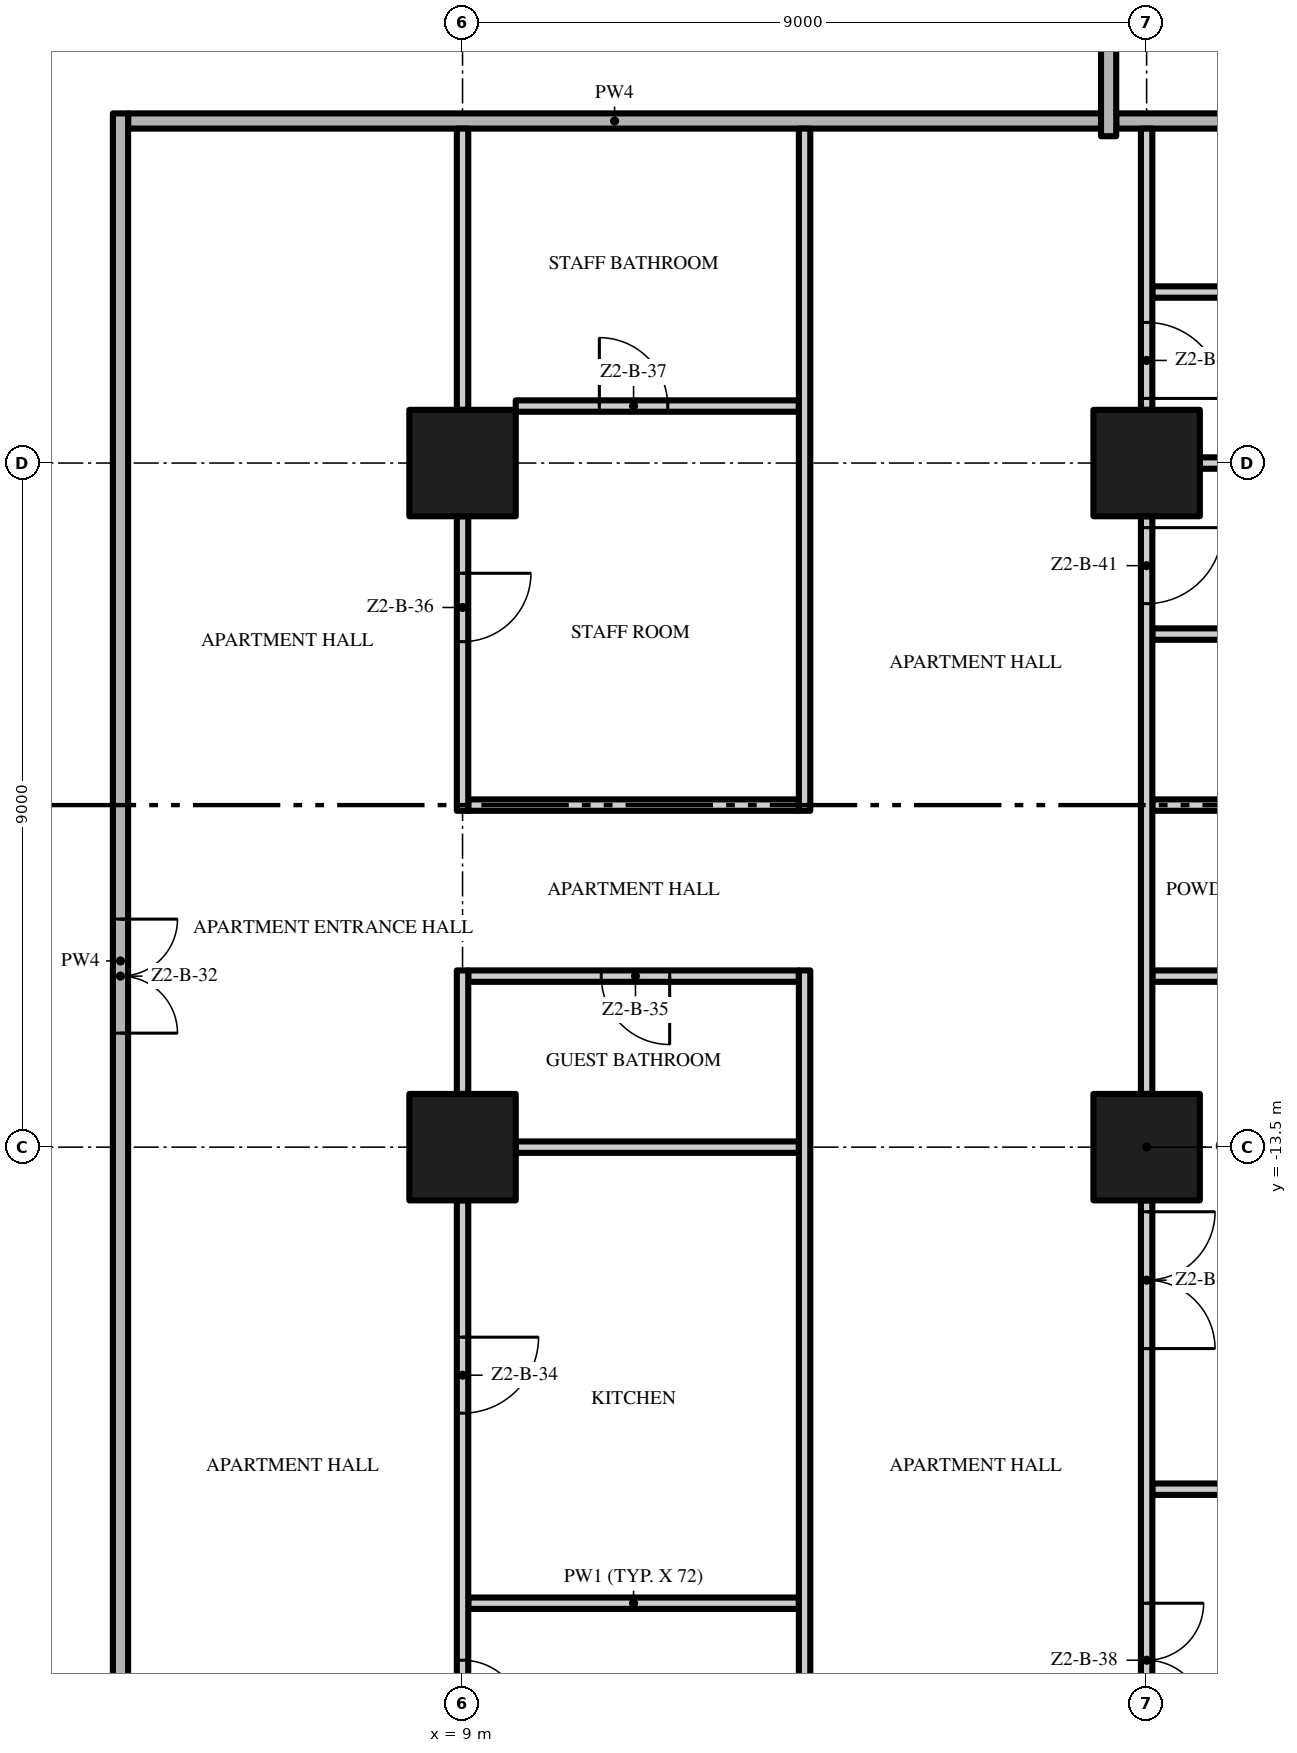
"""IFC4 building model, lengths in metres.
Left out: names, types, materials, properties, quantities, classifications, styles, units other than length and angle.
Written with IfcOpenShell. Run it as: python <this file> out.ifc"""

import sys

from ifc_helpers import new_model, si_unit, direction, frame, frame_2d, origin, origin_2d, place, context, subcontext, project, spatial, rectangle, extrude, element, fill, save


model = new_model("IFC4")
c1 = context("Model", 3, precision=1e-05, world=origin(), true_north=direction((0.0, 1.0)))
c2 = subcontext(c1, "Body", "Model", "MODEL_VIEW")
j1 = project(units=[si_unit("LENGTHUNIT", "METRE"), si_unit("PLANEANGLEUNIT", "RADIAN")], contexts=[c1])
p1 = place(None, origin())
s1 = spatial("IfcSite", under=j1, at=p1, CompositionType="ELEMENT")
p2 = place(p1, origin())
s2 = spatial("IfcBuilding", under=s1, at=p2, CompositionType="ELEMENT")
p3 = place(p2, frame((0.0, 0.0, 84.6)))
s3 = spatial("IfcBuildingStorey", under=s2, at=p3, CompositionType="ELEMENT", Elevation=84.6)
for number, where, z_axis, x_axis in (
    (1, (18.0, -13.5, 0.0), (0.0, 0.0, 1.0), (1.0, 0.0, 0.0)),
    (2, (18.0, -4.5, 0.0), (0.0, 0.0, 1.0), (1.0, 0.0, 0.0)),
    (3, (9.0, -13.5, 0.0), (0.0, 0.0, 1.0), (1.0, 0.0, 0.0)),
    (4, (9.0, -4.5, 0.0), (0.0, 0.0, 1.0), (1.0, 0.0, 0.0)),
):
    element("IfcColumn", number, at=place(p3, frame(where, z_axis=z_axis, x_axis=x_axis)), inside=s3, PredefinedType="COLUMN", context=c2, shape_type="SweptSolid", body=[
        extrude(rectangle(XDim=1.4, YDim=1.4, at=origin_2d()), origin(), (0.0, 0.0, 1.0), 3.5),
    ])
p4 = place(p3, frame((9.075, -19.5, 0.0), z_axis=(0.0, 0.0, 1.0), x_axis=(1.0, 0.0, 0.0)))
e5 = element("IfcWall", 5, at=p4, inside=s3, PredefinedType="PARTITIONING", context=c2, shape_type="SweptSolid", body=[
    extrude(rectangle(XDim=4.35, YDim=0.15, at=frame_2d((2.175, 0.0))), origin(), (0.0, 0.0, 1.0), 3.5),
])
p5 = place(p3, frame((18.075, -18.0, 0.0), z_axis=(0.0, 0.0, 1.0), x_axis=(1.0, 0.0, 0.0)))
e6 = element("IfcWall", 6, at=p5, inside=s3, PredefinedType="PARTITIONING", context=c2, shape_type="SweptSolid", body=[
    extrude(rectangle(XDim=3.775, YDim=0.15, at=frame_2d((1.887, 0.0))), origin(), (0.0, 0.0, 1.0), 3.5),
])
p6 = place(p3, frame((9.7, -13.5, 0.0), z_axis=(0.0, 0.0, 1.0), x_axis=(1.0, 0.0, 0.0)))
e7 = element("IfcWall", 7, at=p6, inside=s3, PredefinedType="PARTITIONING", context=c2, shape_type="SweptSolid", body=[
    extrude(rectangle(XDim=3.725, YDim=0.15, at=frame_2d((1.863, 0.0))), origin(), (0.0, 0.0, 1.0), 3.5),
])
p7 = place(p3, frame((13.425, -11.25, 0.0), z_axis=(0.0, 0.0, 1.0), x_axis=(-1.0, 0.0, 0.0)))
e8 = element("IfcWall", 8, at=p7, inside=s3, PredefinedType="PARTITIONING", context=c2, shape_type="SweptSolid", body=[
    extrude(rectangle(XDim=4.35, YDim=0.15, at=frame_2d((2.175, 0.0))), origin(), (0.0, 0.0, 1.0), 3.5),
])
p8 = place(p7, frame((1.7, 0.0, 0.0)))
e9 = element("IfcOpeningElement", 9, at=p8, cuts=e8, PredefinedType="OPENING", context=c2, shape_type="SweptSolid", body=[
    extrude(rectangle(XDim=0.9, YDim=2.1, at=frame_2d((0.45, 1.05))), frame((0.0, 0.085, 0.0), z_axis=(0.0, -1.0, 0.0), x_axis=(1.0, 0.0, 0.0)), (0.0, 0.0, 1.0), 0.17),
])
p9 = place(p3, frame((18.075, -11.25, 0.0), z_axis=(0.0, 0.0, 1.0), x_axis=(1.0, 0.0, 0.0)))
e10 = element("IfcWall", 10, at=p9, inside=s3, PredefinedType="PARTITIONING", context=c2, shape_type="SweptSolid", body=[
    extrude(rectangle(XDim=2.85, YDim=0.15, at=frame_2d((1.425, 0.0))), origin(), (0.0, 0.0, 1.0), 3.5),
])
p10 = place(p3, frame((9.075, -9.0, 0.0), z_axis=(0.0, 0.0, 1.0), x_axis=(1.0, 0.0, 0.0)))
e11 = element("IfcWall", 11, at=p10, inside=s3, PredefinedType="PARTITIONING", context=c2, shape_type="SweptSolid", body=[
    extrude(rectangle(XDim=4.35, YDim=0.15, at=frame_2d((2.175, 0.0))), origin(), (0.0, 0.0, 1.0), 3.5),
])
for number, where, z_axis, x_axis in (
    (12, (18.075, -9.0, 0.0), (0.0, 0.0, 1.0), (1.0, 0.0, 0.0)),
    (13, (18.075, -6.75, 0.0), (0.0, 0.0, 1.0), (1.0, 0.0, 0.0)),
):
    element("IfcWall", number, at=place(p3, frame(where, z_axis=z_axis, x_axis=x_axis)), inside=s3, PredefinedType="PARTITIONING", context=c2, shape_type="SweptSolid", body=[
        extrude(rectangle(XDim=2.85, YDim=0.15, at=frame_2d((1.425, 0.0))), origin(), (0.0, 0.0, 1.0), 3.5),
    ])
p11 = place(p3, frame((18.7, -4.5, 0.0), z_axis=(0.0, 0.0, 1.0), x_axis=(1.0, 0.0, 0.0)))
e14 = element("IfcWall", 14, at=p11, inside=s3, PredefinedType="PARTITIONING", context=c2, shape_type="SweptSolid", body=[
    extrude(rectangle(XDim=7.0, YDim=0.15, at=frame_2d((3.5, 0.0))), origin(), (0.0, 0.0, 1.0), 3.5),
])
p12 = place(p3, frame((9.7, -3.75, 0.0), z_axis=(0.0, 0.0, 1.0), x_axis=(1.0, 0.0, 0.0)))
e15 = element("IfcWall", 15, at=p12, inside=s3, PredefinedType="PARTITIONING", context=c2, shape_type="SweptSolid", body=[
    extrude(rectangle(XDim=3.725, YDim=0.15, at=frame_2d((1.863, 0.0))), origin(), (0.0, 0.0, 1.0), 3.5),
])
p13 = place(p12, frame((1.1, 0.0, 0.0)))
e16 = element("IfcOpeningElement", 16, at=p13, cuts=e15, PredefinedType="OPENING", context=c2, shape_type="SweptSolid", body=[
    extrude(rectangle(XDim=0.9, YDim=2.1, at=frame_2d((0.45, 1.05))), frame((0.0, 0.085, 0.0), z_axis=(0.0, -1.0, 0.0), x_axis=(1.0, 0.0, 0.0)), (0.0, 0.0, 1.0), 0.17),
])
p14 = place(p3, frame((18.075, -2.25, 0.0), z_axis=(0.0, 0.0, 1.0), x_axis=(1.0, 0.0, 0.0)))
e17 = element("IfcWall", 17, at=p14, inside=s3, PredefinedType="PARTITIONING", context=c2, shape_type="SweptSolid", body=[
    extrude(rectangle(XDim=2.85, YDim=0.15, at=frame_2d((1.425, 0.0))), origin(), (0.0, 0.0, 1.0), 3.5),
])
p15 = place(p3, frame((4.6, 0.0, 0.0), z_axis=(0.0, 0.0, 1.0), x_axis=(1.0, 0.0, 0.0)))
e18 = element("IfcWall", 18, at=p15, inside=s3, PredefinedType="PARTITIONING", context=c2, shape_type="SweptSolid", body=[
    extrude(rectangle(XDim=12.8, YDim=0.2, at=frame_2d((6.4, 0.0))), origin(), (0.0, 0.0, 1.0), 3.5),
])
p16 = place(p3, frame((17.6, 0.0, 0.0), z_axis=(0.0, 0.0, 1.0), x_axis=(1.0, 0.0, 0.0)))
e19 = element("IfcWall", 19, at=p16, inside=s3, PredefinedType="PARTITIONING", context=c2, shape_type="SweptSolid", body=[
    extrude(rectangle(XDim=9.1, YDim=0.2, at=frame_2d((4.55, 0.0))), origin(), (0.0, 0.0, 1.0), 3.5),
])
p17 = place(p3, frame((4.5, 0.1, 0.0), z_axis=(0.0, 0.0, 1.0), x_axis=(0.0, -1.0, 0.0)))
e20 = element("IfcWall", 20, at=p17, inside=s3, PredefinedType="PARTITIONING", context=c2, shape_type="SweptSolid", body=[
    extrude(rectangle(XDim=22.3, YDim=0.2, at=frame_2d((11.15, 0.0))), origin(), (0.0, 0.0, 1.0), 3.5),
])
p18 = place(p17, frame((10.6, 0.0, 0.0)))
e21 = element("IfcOpeningElement", 21, at=p18, cuts=e20, PredefinedType="OPENING", context=c2, shape_type="SweptSolid", body=[
    extrude(rectangle(XDim=1.5, YDim=2.4, at=frame_2d((0.75, 1.2))), frame((0.0, 0.11, 0.0), z_axis=(0.0, -1.0, 0.0), x_axis=(1.0, 0.0, 0.0)), (0.0, 0.0, 1.0), 0.22),
])
p19 = place(p3, frame((9.0, -14.2, 0.0), z_axis=(0.0, 0.0, 1.0), x_axis=(0.0, -1.0, 0.0)))
e22 = element("IfcWall", 22, at=p19, inside=s3, PredefinedType="PARTITIONING", context=c2, shape_type="SweptSolid", body=[
    extrude(rectangle(XDim=7.0, YDim=0.15, at=frame_2d((3.5, 0.0))), origin(), (0.0, 0.0, 1.0), 3.5),
])
p20 = place(p19, frame((6.05, 0.0, 0.0)))
e23 = element("IfcOpeningElement", 23, at=p20, cuts=e22, PredefinedType="OPENING", context=c2, shape_type="SweptSolid", body=[
    extrude(rectangle(XDim=0.8, YDim=2.0, at=frame_2d((0.4, 1.0))), frame((0.0, 0.085, 0.0), z_axis=(0.0, -1.0, 0.0), x_axis=(1.0, 0.0, 0.0)), (0.0, 0.0, 1.0), 0.17),
])
p21 = place(p19, frame((1.8, 0.0, 0.0)))
e24 = element("IfcOpeningElement", 24, at=p21, cuts=e22, PredefinedType="OPENING", context=c2, shape_type="SweptSolid", body=[
    extrude(rectangle(XDim=1.0, YDim=2.4, at=frame_2d((0.5, 1.2))), frame((0.0, 0.085, 0.0), z_axis=(0.0, -1.0, 0.0), x_axis=(1.0, 0.0, 0.0)), (0.0, 0.0, 1.0), 0.17),
])
p22 = place(p3, frame((9.0, -12.8, 0.0), z_axis=(0.0, 0.0, 1.0), x_axis=(0.0, 1.0, 0.0)))
e25 = element("IfcWall", 25, at=p22, inside=s3, PredefinedType="PARTITIONING", context=c2, shape_type="SweptSolid", body=[
    extrude(rectangle(XDim=1.625, YDim=0.15, at=frame_2d((0.812, 0.0))), origin(), (0.0, 0.0, 1.0), 3.5),
])
p23 = place(p3, frame((9.0, -5.2, 0.0), z_axis=(0.0, 0.0, 1.0), x_axis=(0.0, -1.0, 0.0)))
e26 = element("IfcWall", 26, at=p23, inside=s3, PredefinedType="PARTITIONING", context=c2, shape_type="SweptSolid", body=[
    extrude(rectangle(XDim=3.875, YDim=0.15, at=frame_2d((1.938, 0.0))), origin(), (0.0, 0.0, 1.0), 3.5),
])
p24 = place(p23, frame((0.75, 0.0, 0.0)))
e27 = element("IfcOpeningElement", 27, at=p24, cuts=e26, PredefinedType="OPENING", context=c2, shape_type="SweptSolid", body=[
    extrude(rectangle(XDim=0.9, YDim=2.1, at=frame_2d((0.45, 1.05))), frame((0.0, 0.085, 0.0), z_axis=(0.0, -1.0, 0.0), x_axis=(1.0, 0.0, 0.0)), (0.0, 0.0, 1.0), 0.17),
])
p25 = place(p3, frame((9.0, -3.8, 0.0), z_axis=(0.0, 0.0, 1.0), x_axis=(0.0, 1.0, 0.0)))
e28 = element("IfcWall", 28, at=p25, inside=s3, PredefinedType="PARTITIONING", context=c2, shape_type="SweptSolid", body=[
    extrude(rectangle(XDim=3.7, YDim=0.15, at=frame_2d((1.85, 0.0))), origin(), (0.0, 0.0, 1.0), 3.5),
])
p26 = place(p3, frame((13.5, -22.2, 0.0), z_axis=(0.0, 0.0, 1.0), x_axis=(0.0, 1.0, 0.0)))
e29 = element("IfcWall", 29, at=p26, inside=s3, PredefinedType="PARTITIONING", context=c2, shape_type="SweptSolid", body=[
    extrude(rectangle(XDim=11.025, YDim=0.15, at=frame_2d((5.513, 0.0))), origin(), (0.0, 0.0, 1.0), 3.5),
])
p27 = place(p3, frame((13.5, -9.075, 0.0), z_axis=(0.0, 0.0, 1.0), x_axis=(0.0, 1.0, 0.0)))
e30 = element("IfcWall", 30, at=p27, inside=s3, PredefinedType="PARTITIONING", context=c2, shape_type="SweptSolid", body=[
    extrude(rectangle(XDim=8.975, YDim=0.15, at=frame_2d((4.487, 0.0))), origin(), (0.0, 0.0, 1.0), 3.5),
])
p28 = place(p3, frame((17.5, -0.2, 0.0), z_axis=(0.0, 0.0, 1.0), x_axis=(0.0, 1.0, 0.0)))
e31 = element("IfcWall", 31, at=p28, inside=s3, PredefinedType="PARTITIONING", context=c2, shape_type="SweptSolid", body=[
    extrude(rectangle(XDim=4.0, YDim=0.2, at=frame_2d((2.0, 0.0))), origin(), (0.0, 0.0, 1.0), 3.5),
])
p29 = place(p3, frame((18.0, -14.2, 0.0), z_axis=(0.0, 0.0, 1.0), x_axis=(0.0, -1.0, 0.0)))
e32 = element("IfcWall", 32, at=p29, inside=s3, PredefinedType="PARTITIONING", context=c2, shape_type="SweptSolid", body=[
    extrude(rectangle(XDim=7.0, YDim=0.15, at=frame_2d((3.5, 0.0))), origin(), (0.0, 0.0, 1.0), 3.5),
])
p30 = place(p29, frame((5.3, 0.0, 0.0)))
e33 = element("IfcOpeningElement", 33, at=p30, cuts=e32, PredefinedType="OPENING", context=c2, shape_type="SweptSolid", body=[
    extrude(rectangle(XDim=1.5, YDim=2.4, at=frame_2d((0.75, 1.2))), frame((0.0, 0.085, 0.0), z_axis=(0.0, -1.0, 0.0), x_axis=(1.0, 0.0, 0.0)), (0.0, 0.0, 1.0), 0.17),
])
p31 = place(p29, frame((0.15, 0.0, 0.0)))
e34 = element("IfcOpeningElement", 34, at=p31, cuts=e32, PredefinedType="OPENING", context=c2, shape_type="SweptSolid", body=[
    extrude(rectangle(XDim=1.8, YDim=2.4, at=frame_2d((0.9, 1.2))), frame((0.0, 0.085, 0.0), z_axis=(0.0, -1.0, 0.0), x_axis=(1.0, 0.0, 0.0)), (0.0, 0.0, 1.0), 0.17),
])
p32 = place(p3, frame((18.0, -5.2, 0.0), z_axis=(0.0, 0.0, 1.0), x_axis=(0.0, -1.0, 0.0)))
e35 = element("IfcWall", 35, at=p32, inside=s3, PredefinedType="PARTITIONING", context=c2, shape_type="SweptSolid", body=[
    extrude(rectangle(XDim=7.6, YDim=0.15, at=frame_2d((3.8, 0.0))), origin(), (0.0, 0.0, 1.0), 3.5),
])
p33 = place(p32, frame((0.15, 0.0, 0.0)))
e36 = element("IfcOpeningElement", 36, at=p33, cuts=e35, PredefinedType="OPENING", context=c2, shape_type="SweptSolid", body=[
    extrude(rectangle(XDim=1.0, YDim=2.4, at=frame_2d((0.5, 1.2))), frame((0.0, 0.085, 0.0), z_axis=(0.0, -1.0, 0.0), x_axis=(1.0, 0.0, 0.0)), (0.0, 0.0, 1.0), 0.17),
])
p34 = place(p3, frame((18.0, -0.1, 0.0), z_axis=(0.0, 0.0, 1.0), x_axis=(0.0, -1.0, 0.0)))
e37 = element("IfcWall", 37, at=p34, inside=s3, PredefinedType="PARTITIONING", context=c2, shape_type="SweptSolid", body=[
    extrude(rectangle(XDim=3.7, YDim=0.15, at=frame_2d((1.85, 0.0))), origin(), (0.0, 0.0, 1.0), 3.5),
])
p35 = place(p34, frame((2.55, 0.0, 0.0)))
e38 = element("IfcOpeningElement", 38, at=p35, cuts=e37, PredefinedType="OPENING", context=c2, shape_type="SweptSolid", body=[
    extrude(rectangle(XDim=1.0, YDim=2.4, at=frame_2d((0.5, 1.2))), frame((0.0, 0.085, 0.0), z_axis=(0.0, -1.0, 0.0), x_axis=(1.0, 0.0, 0.0)), (0.0, 0.0, 1.0), 0.17),
])
p36 = place(p18, origin())
e39 = element("IfcDoor", 39, at=p36, inside=s3, OperationType="DOUBLE_DOOR_SINGLE_SWING", PredefinedType="DOOR", context=c2, shape_type="SweptSolid", body=[
    extrude(rectangle(XDim=1.5, YDim=2.4, at=frame_2d((0.75, 1.2))), frame((0.0, 0.025, 0.0), z_axis=(0.0, -1.0, 0.0), x_axis=(1.0, 0.0, 0.0)), (0.0, 0.0, 1.0), 0.05),
])
fill(e21, e39)
p37 = place(p20, origin())
e40 = element("IfcDoor", 40, at=p37, inside=s3, OperationType="SINGLE_SWING_RIGHT", PredefinedType="DOOR", context=c2, shape_type="SweptSolid", body=[
    extrude(rectangle(XDim=0.8, YDim=2.0, at=frame_2d((0.4, 1.0))), frame((0.0, 0.025, 0.0), z_axis=(0.0, -1.0, 0.0), x_axis=(1.0, 0.0, 0.0)), (0.0, 0.0, 1.0), 0.05),
])
fill(e23, e40)
p38 = place(p21, origin())
e41 = element("IfcDoor", 41, at=p38, inside=s3, OperationType="SINGLE_SWING_LEFT", PredefinedType="DOOR", context=c2, shape_type="SweptSolid", body=[
    extrude(rectangle(XDim=1.0, YDim=2.4, at=frame_2d((0.5, 1.2))), frame((0.0, 0.025, 0.0), z_axis=(0.0, -1.0, 0.0), x_axis=(1.0, 0.0, 0.0)), (0.0, 0.0, 1.0), 0.05),
])
fill(e24, e41)
p39 = place(p8, origin())
e42 = element("IfcDoor", 42, at=p39, inside=s3, OperationType="SINGLE_SWING_LEFT", PredefinedType="DOOR", context=c2, shape_type="SweptSolid", body=[
    extrude(rectangle(XDim=0.9, YDim=2.1, at=frame_2d((0.45, 1.05))), frame((0.0, 0.025, 0.0), z_axis=(0.0, -1.0, 0.0), x_axis=(1.0, 0.0, 0.0)), (0.0, 0.0, 1.0), 0.05),
])
fill(e9, e42)
p40 = place(p24, origin())
e43 = element("IfcDoor", 43, at=p40, inside=s3, OperationType="SINGLE_SWING_LEFT", PredefinedType="DOOR", context=c2, shape_type="SweptSolid", body=[
    extrude(rectangle(XDim=0.9, YDim=2.1, at=frame_2d((0.45, 1.05))), frame((0.0, 0.025, 0.0), z_axis=(0.0, -1.0, 0.0), x_axis=(1.0, 0.0, 0.0)), (0.0, 0.0, 1.0), 0.05),
])
fill(e27, e43)
p41 = place(p13, origin())
e44 = element("IfcDoor", 44, at=p41, inside=s3, OperationType="SINGLE_SWING_LEFT", PredefinedType="DOOR", context=c2, shape_type="SweptSolid", body=[
    extrude(rectangle(XDim=0.9, YDim=2.1, at=frame_2d((0.45, 1.05))), frame((0.0, 0.025, 0.0), z_axis=(0.0, -1.0, 0.0), x_axis=(1.0, 0.0, 0.0)), (0.0, 0.0, 1.0), 0.05),
])
fill(e16, e44)
p42 = place(p30, origin())
e45 = element("IfcDoor", 45, at=p42, inside=s3, OperationType="DOUBLE_DOOR_SINGLE_SWING", PredefinedType="DOOR", context=c2, shape_type="SweptSolid", body=[
    extrude(rectangle(XDim=1.5, YDim=2.4, at=frame_2d((0.75, 1.2))), frame((0.0, 0.025, 0.0), z_axis=(0.0, -1.0, 0.0), x_axis=(1.0, 0.0, 0.0)), (0.0, 0.0, 1.0), 0.05),
])
fill(e33, e45)
p43 = place(p31, origin())
e46 = element("IfcDoor", 46, at=p43, inside=s3, OperationType="DOUBLE_DOOR_SINGLE_SWING", PredefinedType="DOOR", context=c2, shape_type="SweptSolid", body=[
    extrude(rectangle(XDim=1.8, YDim=2.4, at=frame_2d((0.9, 1.2))), frame((0.0, 0.025, 0.0), z_axis=(0.0, -1.0, 0.0), x_axis=(1.0, 0.0, 0.0)), (0.0, 0.0, 1.0), 0.05),
])
fill(e34, e46)
p44 = place(p33, origin())
e47 = element("IfcDoor", 47, at=p44, inside=s3, OperationType="SINGLE_SWING_LEFT", PredefinedType="DOOR", context=c2, shape_type="SweptSolid", body=[
    extrude(rectangle(XDim=1.0, YDim=2.4, at=frame_2d((0.5, 1.2))), frame((0.0, 0.025, 0.0), z_axis=(0.0, -1.0, 0.0), x_axis=(1.0, 0.0, 0.0)), (0.0, 0.0, 1.0), 0.05),
])
fill(e36, e47)
p45 = place(p35, origin())
e48 = element("IfcDoor", 48, at=p45, inside=s3, OperationType="SINGLE_SWING_RIGHT", PredefinedType="DOOR", context=c2, shape_type="SweptSolid", body=[
    extrude(rectangle(XDim=1.0, YDim=2.4, at=frame_2d((0.5, 1.2))), frame((0.0, 0.025, 0.0), z_axis=(0.0, -1.0, 0.0), x_axis=(1.0, 0.0, 0.0)), (0.0, 0.0, 1.0), 0.05),
])
fill(e38, e48)
save(model, sys.argv[1])
